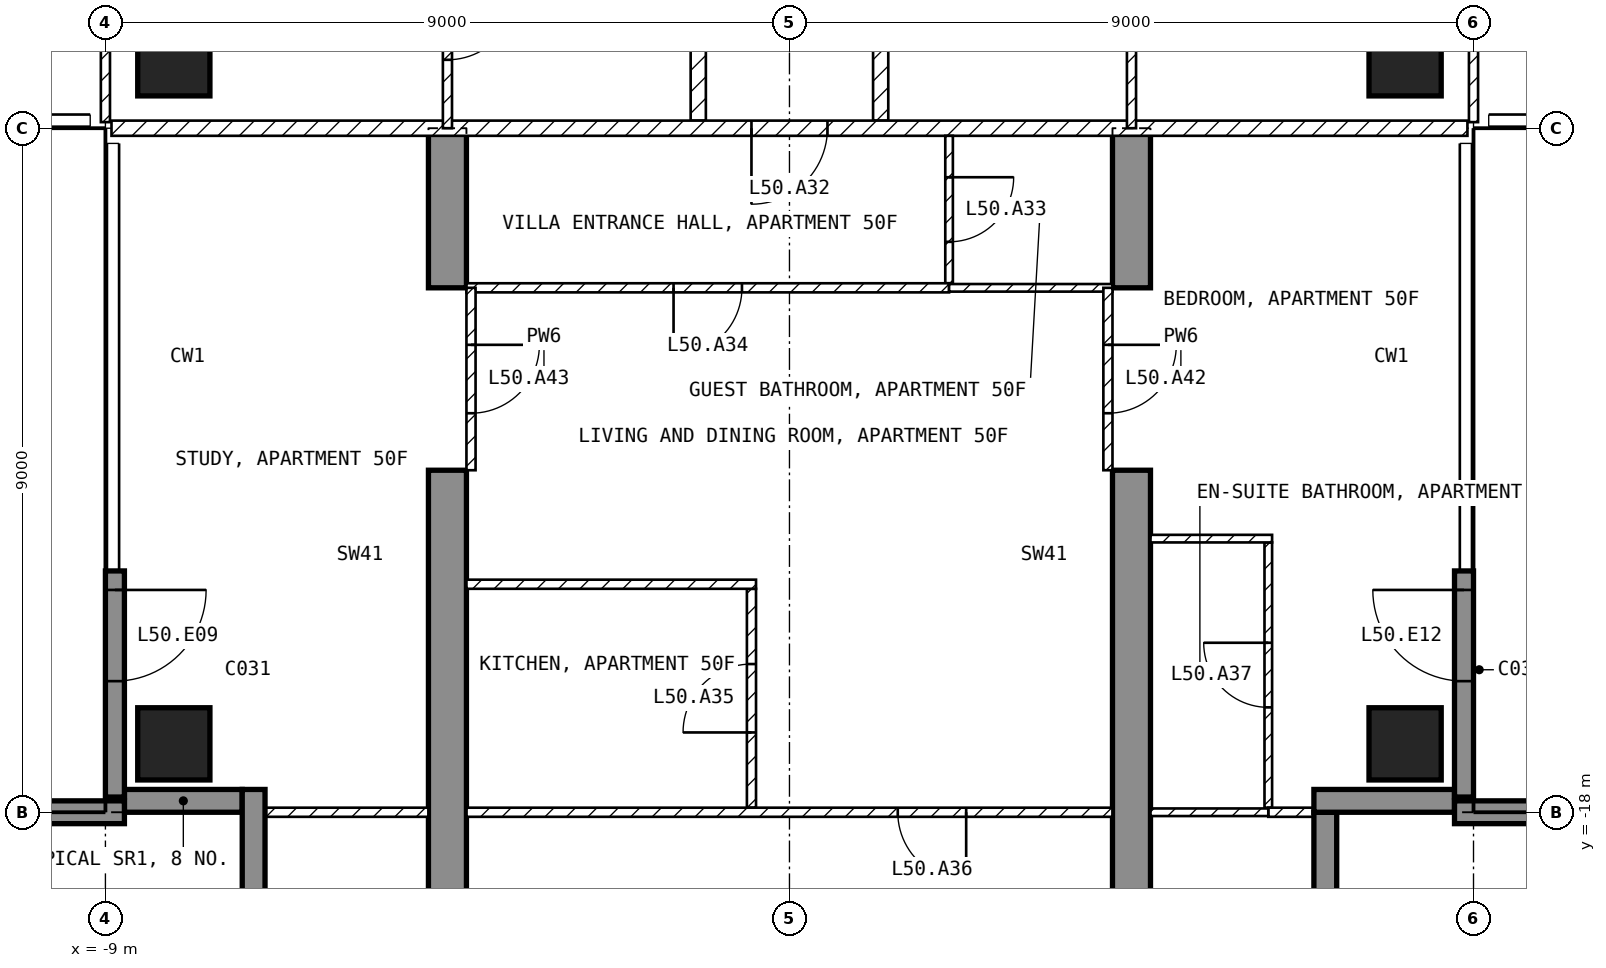
"""IFC4 building model, lengths in metres.
Left out: names, types, materials, properties, quantities, classifications, styles, units other than length and angle.
Written with IfcOpenShell. Run it as: python <this file> out.ifc"""

import sys

from ifc_helpers import new_model, si_unit, direction, frame, frame_2d, origin, origin_2d, place, context, subcontext, project, spatial, polyline, rectangle, outline, extrude, element, fill, save


model = new_model("IFC4")
c1 = context("Model", 3, precision=1e-05, world=origin(), true_north=direction((0.0, 1.0)))
c2 = subcontext(c1, "Body", "Model", "MODEL_VIEW")
j1 = project(units=[si_unit("LENGTHUNIT", "METRE"), si_unit("PLANEANGLEUNIT", "RADIAN")], contexts=[c1])
p1 = place(None, origin())
s1 = spatial("IfcSite", under=j1, at=p1, CompositionType="ELEMENT")
p2 = place(p1, origin())
s2 = spatial("IfcBuilding", under=s1, at=p2, CompositionType="ELEMENT")
p3 = place(p2, frame((0.0, 0.0, 201.6)))
s3 = spatial("IfcBuildingStorey", under=s2, at=p3, CompositionType="ELEMENT", Elevation=201.6)
for number, where, z_axis, x_axis in (
    (1, (-8.1, -17.1, -0.25), (0.0, 0.0, 1.0), (1.0, 0.0, 0.0)),
    (2, (-8.1, -8.1, -0.25), (0.0, 0.0, 1.0), (1.0, 0.0, 0.0)),
    (3, (8.1, -17.1, -0.25), (0.0, 0.0, 1.0), (1.0, 0.0, 0.0)),
    (4, (8.1, -8.1, -0.25), (0.0, 0.0, 1.0), (1.0, 0.0, 0.0)),
):
    element("IfcColumn", number, at=place(p3, frame(where, z_axis=z_axis, x_axis=x_axis)), inside=s3, PredefinedType="COLUMN", context=c2, shape_type="SweptSolid", body=[
        extrude(rectangle(XDim=0.95, YDim=0.95, at=origin_2d()), origin(), (0.0, 0.0, 1.0), 3.5),
    ])
for number, where, z_axis, x_axis in (
    (5, (-4.75, -20.225, -0.25), (1.0, 0.0, 0.0), (0.0, 1.0, 0.0)),
    (6, (4.25, -20.225, -0.25), (1.0, 0.0, 0.0), (0.0, 1.0, 0.0)),
):
    element("IfcWall", number, at=place(p3, frame(where, z_axis=z_axis, x_axis=x_axis)), inside=s3, PredefinedType="SHEAR", context=c2, shape_type="SweptSolid", body=[
        extrude(outline(polyline([(0.0, 0.0), (6.725, 0.0), (6.725, 2.65), (9.125, 2.65), (9.125, 0.0), (11.225, 0.0), (11.225, 3.5), (0.0, 3.5), (0.0, 0.0)])), origin(), (0.0, 0.0, 1.0), 0.5),
    ])
p4 = place(p3, frame((-8.875, -14.825, 0.0), z_axis=(0.0, 0.0, 1.0), x_axis=(0.0, -1.0, 0.0)))
e7 = element("IfcWall", 7, at=p4, inside=s3, PredefinedType="SOLIDWALL", context=c2, shape_type="SweptSolid", body=[
    extrude(rectangle(XDim=2.975, YDim=0.25, at=frame_2d((1.488, 0.0))), origin(), (0.0, 0.0, 1.0), 3.25),
])
p5 = place(p4, frame((0.25, 0.0, 0.0)))
e8 = element("IfcOpeningElement", 8, at=p5, cuts=e7, PredefinedType="OPENING", context=c2, shape_type="SweptSolid", body=[
    extrude(rectangle(XDim=1.2, YDim=2.4, at=frame_2d((0.6, 1.2))), frame((0.0, 0.135, 0.0), z_axis=(0.0, -1.0, 0.0), x_axis=(1.0, 0.0, 0.0)), (0.0, 0.0, 1.0), 0.27),
])
p6 = place(p3, frame((8.875, -17.8, 0.0), z_axis=(0.0, 0.0, 1.0), x_axis=(0.0, 1.0, 0.0)))
e9 = element("IfcWall", 9, at=p6, inside=s3, PredefinedType="SOLIDWALL", context=c2, shape_type="SweptSolid", body=[
    extrude(rectangle(XDim=2.975, YDim=0.25, at=frame_2d((1.488, 0.0))), origin(), (0.0, 0.0, 1.0), 3.25),
])
p7 = place(p6, frame((1.525, 0.0, 0.0)))
e10 = element("IfcOpeningElement", 10, at=p7, cuts=e9, PredefinedType="OPENING", context=c2, shape_type="SweptSolid", body=[
    extrude(rectangle(XDim=1.2, YDim=2.4, at=frame_2d((0.6, 1.2))), frame((0.0, 0.135, 0.0), z_axis=(0.0, -1.0, 0.0), x_axis=(1.0, 0.0, 0.0)), (0.0, 0.0, 1.0), 0.27),
])
p8 = place(p3, frame((7.05, -19.8, 0.0), z_axis=(0.0, 0.0, 1.0), x_axis=(0.0, 1.0, 0.0)))
e11 = element("IfcWall", 11, at=p8, inside=s3, PredefinedType="SOLIDWALL", context=c2, shape_type="SweptSolid", body=[
    extrude(rectangle(XDim=1.8, YDim=0.3, at=frame_2d((0.9, 0.0))), origin(), (0.0, 0.0, 1.0), 3.25),
])
p9 = place(p3, frame((6.9, -17.85, 0.0), z_axis=(0.0, 0.0, 1.0), x_axis=(1.0, 0.0, 0.0)))
e12 = element("IfcWall", 12, at=p9, inside=s3, PredefinedType="SOLIDWALL", context=c2, shape_type="SweptSolid", body=[
    extrude(rectangle(XDim=1.85, YDim=0.3, at=frame_2d((0.925, 0.0))), origin(), (0.0, 0.0, 1.0), 3.25),
])
p10 = place(p3, frame((-8.75, -17.85, 0.0), z_axis=(0.0, 0.0, 1.0), x_axis=(1.0, 0.0, 0.0)))
e13 = element("IfcWall", 13, at=p10, inside=s3, PredefinedType="SOLIDWALL", context=c2, shape_type="SweptSolid", body=[
    extrude(rectangle(XDim=1.55, YDim=0.3, at=frame_2d((0.775, 0.0))), origin(), (0.0, 0.0, 1.0), 3.25),
])
p11 = place(p3, frame((-7.05, -17.7, 0.0), z_axis=(0.0, 0.0, 1.0), x_axis=(0.0, -1.0, 0.0)))
e14 = element("IfcWall", 14, at=p11, inside=s3, PredefinedType="SOLIDWALL", context=c2, shape_type="SweptSolid", body=[
    extrude(rectangle(XDim=1.8, YDim=0.3, at=frame_2d((0.9, 0.0))), origin(), (0.0, 0.0, 1.0), 3.25),
])
for number, where, z_axis, x_axis in (
    (15, (-8.75, -18.0, 0.0), (0.0, 0.0, 1.0), (-1.0, 0.0, 0.0)),
    (16, (8.75, -18.0, 0.0), (0.0, 0.0, 1.0), (1.0, 0.0, 0.0)),
):
    element("IfcWall", number, at=place(p3, frame(where, z_axis=z_axis, x_axis=x_axis)), inside=s3, PredefinedType="SOLIDWALL", context=c2, shape_type="SweptSolid", body=[
        extrude(rectangle(XDim=2.95, YDim=0.3, at=frame_2d((1.475, 0.0))), origin(), (0.0, 0.0, 1.0), 3.25),
    ])
for number, where, z_axis, x_axis in (
    (17, (1.2, -4.6, 0.0), (0.0, 0.0, 1.0), (0.0, -1.0, 0.0)),
    (18, (-1.2, -8.9, 0.0), (0.0, 0.0, 1.0), (0.0, 1.0, 0.0)),
):
    element("IfcWall", number, at=place(p3, frame(where, z_axis=z_axis, x_axis=x_axis)), inside=s3, PredefinedType="PARTITIONING", context=c2, shape_type="SweptSolid", body=[
        extrude(rectangle(XDim=4.3, YDim=0.2, at=frame_2d((2.15, 0.0))), origin(), (0.0, 0.0, 1.0), 3.25),
    ])
p12 = place(p3, frame((8.92, -9.0, 0.0), z_axis=(0.0, 0.0, 1.0), x_axis=(-1.0, 0.0, 0.0)))
e19 = element("IfcWall", 19, at=p12, inside=s3, PredefinedType="PARTITIONING", context=c2, shape_type="SweptSolid", body=[
    extrude(rectangle(XDim=17.84, YDim=0.2, at=frame_2d((8.92, 0.0))), origin(), (0.0, 0.0, 1.0), 3.25),
])
p13 = place(p12, frame((8.42, 0.0, 0.0)))
e20 = element("IfcOpeningElement", 20, at=p13, cuts=e19, PredefinedType="OPENING", context=c2, shape_type="SweptSolid", body=[
    extrude(rectangle(XDim=1.0, YDim=2.1, at=frame_2d((0.5, 1.05))), frame((0.0, 0.11, 0.0), z_axis=(0.0, -1.0, 0.0), x_axis=(1.0, 0.0, 0.0)), (0.0, 0.0, 1.0), 0.22),
])
p14 = place(p3, frame((9.0, -8.92, 0.0), z_axis=(0.0, 0.0, 1.0), x_axis=(0.0, 1.0, 0.0)))
e21 = element("IfcWall", 21, at=p14, inside=s3, PredefinedType="PARTITIONING", context=c2, shape_type="SweptSolid", body=[
    extrude(rectangle(XDim=7.62, YDim=0.12, at=frame_2d((3.81, 0.0))), origin(), (0.0, 0.0, 1.0), 3.25),
])
p15 = place(p14, frame((2.42, 0.0, 0.0)))
e22 = element("IfcOpeningElement", 22, at=p15, cuts=e21, PredefinedType="OPENING", context=c2, shape_type="SweptSolid", body=[
    extrude(rectangle(XDim=0.9, YDim=2.1, at=frame_2d((0.45, 1.05))), frame((0.0, 0.07, 0.0), z_axis=(0.0, -1.0, 0.0), x_axis=(1.0, 0.0, 0.0)), (0.0, 0.0, 1.0), 0.14),
])
p16 = place(p3, frame((4.5, -9.0, 0.0), z_axis=(0.0, 0.0, 1.0), x_axis=(0.0, 1.0, 0.0)))
e23 = element("IfcWall", 23, at=p16, inside=s3, PredefinedType="PARTITIONING", context=c2, shape_type="SweptSolid", body=[
    extrude(rectangle(XDim=4.5, YDim=0.12, at=frame_2d((2.25, 0.0))), origin(), (0.0, 0.0, 1.0), 3.25),
])
p17 = place(p16, frame((1.8, 0.0, 0.0)))
e24 = element("IfcOpeningElement", 24, at=p17, cuts=e23, PredefinedType="OPENING", context=c2, shape_type="SweptSolid", body=[
    extrude(rectangle(XDim=0.9, YDim=2.1, at=frame_2d((0.45, 1.05))), frame((0.0, 0.07, 0.0), z_axis=(0.0, -1.0, 0.0), x_axis=(1.0, 0.0, 0.0)), (0.0, 0.0, 1.0), 0.14),
])
p18 = place(p3, frame((-9.0, -1.3, 0.0), z_axis=(0.0, 0.0, 1.0), x_axis=(0.0, -1.0, 0.0)))
e25 = element("IfcWall", 25, at=p18, inside=s3, PredefinedType="PARTITIONING", context=c2, shape_type="SweptSolid", body=[
    extrude(rectangle(XDim=7.62, YDim=0.12, at=frame_2d((3.81, 0.0))), origin(), (0.0, 0.0, 1.0), 3.25),
])
p19 = place(p18, frame((4.1, 0.0, 0.0)))
e26 = element("IfcOpeningElement", 26, at=p19, cuts=e25, PredefinedType="OPENING", context=c2, shape_type="SweptSolid", body=[
    extrude(rectangle(XDim=0.9, YDim=2.1, at=frame_2d((0.45, 1.05))), frame((0.0, 0.07, 0.0), z_axis=(0.0, -1.0, 0.0), x_axis=(1.0, 0.0, 0.0)), (0.0, 0.0, 1.0), 0.14),
])
p20 = place(p3, frame((-4.5, -6.3, 0.0), z_axis=(0.0, 0.0, 1.0), x_axis=(0.0, -1.0, 0.0)))
e27 = element("IfcWall", 27, at=p20, inside=s3, PredefinedType="PARTITIONING", context=c2, shape_type="SweptSolid", body=[
    extrude(rectangle(XDim=2.7, YDim=0.12, at=frame_2d((1.35, 0.0))), origin(), (0.0, 0.0, 1.0), 3.25),
])
p21 = place(p20, frame((0.9, 0.0, 0.0)))
e28 = element("IfcOpeningElement", 28, at=p21, cuts=e27, PredefinedType="OPENING", context=c2, shape_type="SweptSolid", body=[
    extrude(rectangle(XDim=0.9, YDim=2.1, at=frame_2d((0.45, 1.05))), frame((0.0, 0.07, 0.0), z_axis=(0.0, -1.0, 0.0), x_axis=(1.0, 0.0, 0.0)), (0.0, 0.0, 1.0), 0.14),
])
p22 = place(p3, frame((2.1, -9.1, 0.0), z_axis=(0.0, 0.0, 1.0), x_axis=(0.0, -1.0, 0.0)))
e29 = element("IfcWall", 29, at=p22, inside=s3, PredefinedType="PARTITIONING", context=c2, shape_type="SweptSolid", body=[
    extrude(rectangle(XDim=1.94, YDim=0.1, at=frame_2d((0.97, 0.0))), origin(), (0.0, 0.0, 1.0), 3.25),
])
p23 = place(p22, frame((0.545, 0.0, 0.0)))
e30 = element("IfcOpeningElement", 30, at=p23, cuts=e29, PredefinedType="OPENING", context=c2, shape_type="SweptSolid", body=[
    extrude(rectangle(XDim=0.85, YDim=2.1, at=frame_2d((0.425, 1.05))), frame((0.0, 0.06, 0.0), z_axis=(0.0, -1.0, 0.0), x_axis=(1.0, 0.0, 0.0)), (0.0, 0.0, 1.0), 0.12),
])
p24 = place(p3, frame((2.1, -11.1, 0.0), z_axis=(0.0, 0.0, 1.0), x_axis=(-1.0, 0.0, 0.0)))
e31 = element("IfcWall", 31, at=p24, inside=s3, PredefinedType="PARTITIONING", context=c2, shape_type="SweptSolid", body=[
    extrude(rectangle(XDim=6.35, YDim=0.12, at=frame_2d((3.175, 0.0))), origin(), (0.0, 0.0, 1.0), 3.25),
])
p25 = place(p24, frame((2.725, 0.0, 0.0)))
e32 = element("IfcOpeningElement", 32, at=p25, cuts=e31, PredefinedType="OPENING", context=c2, shape_type="SweptSolid", body=[
    extrude(rectangle(XDim=0.9, YDim=2.1, at=frame_2d((0.45, 1.05))), frame((0.0, 0.07, 0.0), z_axis=(0.0, -1.0, 0.0), x_axis=(1.0, 0.0, 0.0)), (0.0, 0.0, 1.0), 0.14),
])
p26 = place(p3, frame((4.25, -11.1, 0.0), z_axis=(0.0, 0.0, 1.0), x_axis=(-1.0, 0.0, 0.0)))
e33 = element("IfcWall", 33, at=p26, inside=s3, PredefinedType="PARTITIONING", context=c2, shape_type="SweptSolid", body=[
    extrude(rectangle(XDim=2.15, YDim=0.1, at=frame_2d((1.075, 0.0))), origin(), (0.0, 0.0, 1.0), 3.25),
])
p27 = place(p3, frame((-0.5, -17.94, 0.0), z_axis=(0.0, 0.0, 1.0), x_axis=(0.0, 1.0, 0.0)))
e34 = element("IfcWall", 34, at=p27, inside=s3, PredefinedType="PARTITIONING", context=c2, shape_type="SweptSolid", body=[
    extrude(rectangle(XDim=2.88, YDim=0.12, at=frame_2d((1.44, 0.0))), origin(), (0.0, 0.0, 1.0), 3.25),
])
p28 = place(p27, frame((0.99, 0.0, 0.0)))
e35 = element("IfcOpeningElement", 35, at=p28, cuts=e34, PredefinedType="OPENING", context=c2, shape_type="SweptSolid", body=[
    extrude(rectangle(XDim=0.9, YDim=2.1, at=frame_2d((0.45, 1.05))), frame((0.0, 0.07, 0.0), z_axis=(0.0, -1.0, 0.0), x_axis=(1.0, 0.0, 0.0)), (0.0, 0.0, 1.0), 0.14),
])
p29 = place(p3, frame((-0.44, -15.0, 0.0), z_axis=(0.0, 0.0, 1.0), x_axis=(-1.0, 0.0, 0.0)))
e36 = element("IfcWall", 36, at=p29, inside=s3, PredefinedType="PARTITIONING", context=c2, shape_type="SweptSolid", body=[
    extrude(rectangle(XDim=3.81, YDim=0.12, at=frame_2d((1.905, 0.0))), origin(), (0.0, 0.0, 1.0), 3.25),
])
p30 = place(p3, frame((4.25, -18.0, 0.0), z_axis=(0.0, 0.0, 1.0), x_axis=(-1.0, 0.0, 0.0)))
e37 = element("IfcWall", 37, at=p30, inside=s3, PredefinedType="PARTITIONING", context=c2, shape_type="SweptSolid", body=[
    extrude(rectangle(XDim=8.5, YDim=0.12, at=frame_2d((4.25, 0.0))), origin(), (0.0, 0.0, 1.0), 3.25),
])
p31 = place(p30, frame((1.925, 0.0, 0.0)))
e38 = element("IfcOpeningElement", 38, at=p31, cuts=e37, PredefinedType="OPENING", context=c2, shape_type="SweptSolid", body=[
    extrude(rectangle(XDim=0.9, YDim=2.1, at=frame_2d((0.45, 1.05))), frame((0.0, 0.07, 0.0), z_axis=(0.0, -1.0, 0.0), x_axis=(1.0, 0.0, 0.0)), (0.0, 0.0, 1.0), 0.14),
])
p32 = place(p3, frame((6.3, -17.94, 0.0), z_axis=(0.0, 0.0, 1.0), x_axis=(0.0, 1.0, 0.0)))
e39 = element("IfcWall", 39, at=p32, inside=s3, PredefinedType="PARTITIONING", context=c2, shape_type="SweptSolid", body=[
    extrude(rectangle(XDim=3.49, YDim=0.1, at=frame_2d((1.745, 0.0))), origin(), (0.0, 0.0, 1.0), 3.25),
])
p33 = place(p32, frame((1.32, 0.0, 0.0)))
e40 = element("IfcOpeningElement", 40, at=p33, cuts=e39, PredefinedType="OPENING", context=c2, shape_type="SweptSolid", body=[
    extrude(rectangle(XDim=0.85, YDim=2.1, at=frame_2d((0.425, 1.05))), frame((0.0, 0.06, 0.0), z_axis=(0.0, -1.0, 0.0), x_axis=(1.0, 0.0, 0.0)), (0.0, 0.0, 1.0), 0.12),
])
p34 = place(p3, frame((6.35, -14.4, 0.0), z_axis=(0.0, 0.0, 1.0), x_axis=(-1.0, 0.0, 0.0)))
e41 = element("IfcWall", 41, at=p34, inside=s3, PredefinedType="PARTITIONING", context=c2, shape_type="SweptSolid", body=[
    extrude(rectangle(XDim=1.6, YDim=0.1, at=frame_2d((0.8, 0.0))), origin(), (0.0, 0.0, 1.0), 3.25),
])
p35 = place(p3, frame((7.12, -18.0, 0.0), z_axis=(0.0, 0.0, 1.0), x_axis=(-1.0, 0.0, 0.0)))
e42 = element("IfcWall", 42, at=p35, inside=s3, PredefinedType="PARTITIONING", context=c2, shape_type="SweptSolid", body=[
    extrude(rectangle(XDim=0.82, YDim=0.12, at=frame_2d((0.41, 0.0))), origin(), (0.0, 0.0, 1.0), 3.25),
])
p36 = place(p3, frame((6.3, -18.0, 0.0), z_axis=(0.0, 0.0, 1.0), x_axis=(-1.0, 0.0, 0.0)))
e43 = element("IfcWall", 43, at=p36, inside=s3, PredefinedType="PARTITIONING", context=c2, shape_type="SweptSolid", body=[
    extrude(rectangle(XDim=1.55, YDim=0.1, at=frame_2d((0.775, 0.0))), origin(), (0.0, 0.0, 1.0), 3.25),
])
p37 = place(p3, frame((-4.75, -18.0, 0.0), z_axis=(0.0, 0.0, 1.0), x_axis=(-1.0, 0.0, 0.0)))
e44 = element("IfcWall", 44, at=p37, inside=s3, PredefinedType="PARTITIONING", context=c2, shape_type="SweptSolid", body=[
    extrude(rectangle(XDim=2.37, YDim=0.12, at=frame_2d((1.185, 0.0))), origin(), (0.0, 0.0, 1.0), 3.25),
])
p38 = place(p3, frame((4.19, -11.1, 0.0), z_axis=(0.0, 0.0, 1.0), x_axis=(0.0, -1.0, 0.0)))
e45 = element("IfcWall", 45, at=p38, inside=s3, PredefinedType="PARTITIONING", context=c2, shape_type="SweptSolid", body=[
    extrude(rectangle(XDim=2.4, YDim=0.12, at=frame_2d((1.2, 0.0))), origin(), (0.0, 0.0, 1.0), 2.4),
])
p39 = place(p38, frame((0.75, 0.0, 0.0)))
e46 = element("IfcOpeningElement", 46, at=p39, cuts=e45, PredefinedType="OPENING", context=c2, shape_type="SweptSolid", body=[
    extrude(rectangle(XDim=0.9, YDim=2.1, at=frame_2d((0.45, 1.05))), frame((0.0, 0.07, 0.0), z_axis=(0.0, -1.0, 0.0), x_axis=(1.0, 0.0, 0.0)), (0.0, 0.0, 1.0), 0.14),
])
p40 = place(p3, frame((-4.19, -11.1, 0.0), z_axis=(0.0, 0.0, 1.0), x_axis=(0.0, -1.0, 0.0)))
e47 = element("IfcWall", 47, at=p40, inside=s3, PredefinedType="PARTITIONING", context=c2, shape_type="SweptSolid", body=[
    extrude(rectangle(XDim=2.4, YDim=0.12, at=frame_2d((1.2, 0.0))), origin(), (0.0, 0.0, 1.0), 2.4),
])
p41 = place(p40, frame((0.75, 0.0, 0.0)))
e48 = element("IfcOpeningElement", 48, at=p41, cuts=e47, PredefinedType="OPENING", context=c2, shape_type="SweptSolid", body=[
    extrude(rectangle(XDim=0.9, YDim=2.1, at=frame_2d((0.45, 1.05))), frame((0.0, 0.07, 0.0), z_axis=(0.0, -1.0, 0.0), x_axis=(1.0, 0.0, 0.0)), (0.0, 0.0, 1.0), 0.14),
])
p42 = place(p5, origin())
e49 = element("IfcDoor", 49, at=p42, inside=s3, OperationType="SINGLE_SWING_LEFT", PredefinedType="DOOR", context=c2, shape_type="SweptSolid", body=[
    extrude(rectangle(XDim=1.2, YDim=2.4, at=frame_2d((0.6, 1.2))), frame((0.0, 0.025, 0.0), z_axis=(0.0, -1.0, 0.0), x_axis=(1.0, 0.0, 0.0)), (0.0, 0.0, 1.0), 0.05),
])
fill(e8, e49)
p43 = place(p7, origin())
e50 = element("IfcDoor", 50, at=p43, inside=s3, OperationType="SINGLE_SWING_RIGHT", PredefinedType="DOOR", context=c2, shape_type="SweptSolid", body=[
    extrude(rectangle(XDim=1.2, YDim=2.4, at=frame_2d((0.6, 1.2))), frame((0.0, 0.025, 0.0), z_axis=(0.0, -1.0, 0.0), x_axis=(1.0, 0.0, 0.0)), (0.0, 0.0, 1.0), 0.05),
])
fill(e10, e50)
p44 = place(p21, origin())
e51 = element("IfcDoor", 51, at=p44, inside=s3, OperationType="SINGLE_SWING_LEFT", PredefinedType="DOOR", context=c2, shape_type="SweptSolid", body=[
    extrude(rectangle(XDim=0.9, YDim=2.1, at=frame_2d((0.45, 1.05))), frame((0.0, 0.025, 0.0), z_axis=(0.0, -1.0, 0.0), x_axis=(1.0, 0.0, 0.0)), (0.0, 0.0, 1.0), 0.05),
])
fill(e28, e51)
p45 = place(p13, origin())
e52 = element("IfcDoor", 52, at=p45, inside=s3, OperationType="SINGLE_SWING_RIGHT", PredefinedType="DOOR", context=c2, shape_type="SweptSolid", body=[
    extrude(rectangle(XDim=1.0, YDim=2.1, at=frame_2d((0.5, 1.05))), frame((0.0, 0.025, 0.0), z_axis=(0.0, -1.0, 0.0), x_axis=(1.0, 0.0, 0.0)), (0.0, 0.0, 1.0), 0.05),
])
fill(e20, e52)
p46 = place(p23, origin())
e53 = element("IfcDoor", 53, at=p46, inside=s3, OperationType="SINGLE_SWING_LEFT", PredefinedType="DOOR", context=c2, shape_type="SweptSolid", body=[
    extrude(rectangle(XDim=0.85, YDim=2.1, at=frame_2d((0.425, 1.05))), frame((0.0, 0.025, 0.0), z_axis=(0.0, -1.0, 0.0), x_axis=(1.0, 0.0, 0.0)), (0.0, 0.0, 1.0), 0.05),
])
fill(e30, e53)
p47 = place(p25, origin())
e54 = element("IfcDoor", 54, at=p47, inside=s3, OperationType="SINGLE_SWING_RIGHT", PredefinedType="DOOR", context=c2, shape_type="SweptSolid", body=[
    extrude(rectangle(XDim=0.9, YDim=2.1, at=frame_2d((0.45, 1.05))), frame((0.0, 0.025, 0.0), z_axis=(0.0, -1.0, 0.0), x_axis=(1.0, 0.0, 0.0)), (0.0, 0.0, 1.0), 0.05),
])
fill(e32, e54)
p48 = place(p28, origin())
e55 = element("IfcDoor", 55, at=p48, inside=s3, OperationType="SINGLE_SWING_LEFT", PredefinedType="DOOR", context=c2, shape_type="SweptSolid", body=[
    extrude(rectangle(XDim=0.9, YDim=2.1, at=frame_2d((0.45, 1.05))), frame((0.0, 0.025, 0.0), z_axis=(0.0, -1.0, 0.0), x_axis=(1.0, 0.0, 0.0)), (0.0, 0.0, 1.0), 0.05),
])
fill(e35, e55)
p49 = place(p31, origin())
e56 = element("IfcDoor", 56, at=p49, inside=s3, OperationType="SINGLE_SWING_LEFT", PredefinedType="DOOR", context=c2, shape_type="SweptSolid", body=[
    extrude(rectangle(XDim=0.9, YDim=2.1, at=frame_2d((0.45, 1.05))), frame((0.0, 0.025, 0.0), z_axis=(0.0, -1.0, 0.0), x_axis=(1.0, 0.0, 0.0)), (0.0, 0.0, 1.0), 0.05),
])
fill(e38, e56)
p50 = place(p33, origin())
e57 = element("IfcDoor", 57, at=p50, inside=s3, OperationType="SINGLE_SWING_RIGHT", PredefinedType="DOOR", context=c2, shape_type="SweptSolid", body=[
    extrude(rectangle(XDim=0.85, YDim=2.1, at=frame_2d((0.425, 1.05))), frame((0.0, 0.025, 0.0), z_axis=(0.0, -1.0, 0.0), x_axis=(1.0, 0.0, 0.0)), (0.0, 0.0, 1.0), 0.05),
])
fill(e40, e57)
p51 = place(p39, origin())
e58 = element("IfcDoor", 58, at=p51, inside=s3, OperationType="SINGLE_SWING_LEFT", PredefinedType="DOOR", context=c2, shape_type="SweptSolid", body=[
    extrude(rectangle(XDim=0.9, YDim=2.1, at=frame_2d((0.45, 1.05))), frame((0.0, 0.025, 0.0), z_axis=(0.0, -1.0, 0.0), x_axis=(1.0, 0.0, 0.0)), (0.0, 0.0, 1.0), 0.05),
])
fill(e46, e58)
p52 = place(p41, origin())
e59 = element("IfcDoor", 59, at=p52, inside=s3, OperationType="SINGLE_SWING_LEFT", PredefinedType="DOOR", context=c2, shape_type="SweptSolid", body=[
    extrude(rectangle(XDim=0.9, YDim=2.1, at=frame_2d((0.45, 1.05))), frame((0.0, 0.025, 0.0), z_axis=(0.0, -1.0, 0.0), x_axis=(1.0, 0.0, 0.0)), (0.0, 0.0, 1.0), 0.05),
])
fill(e48, e59)
save(model, sys.argv[1])
